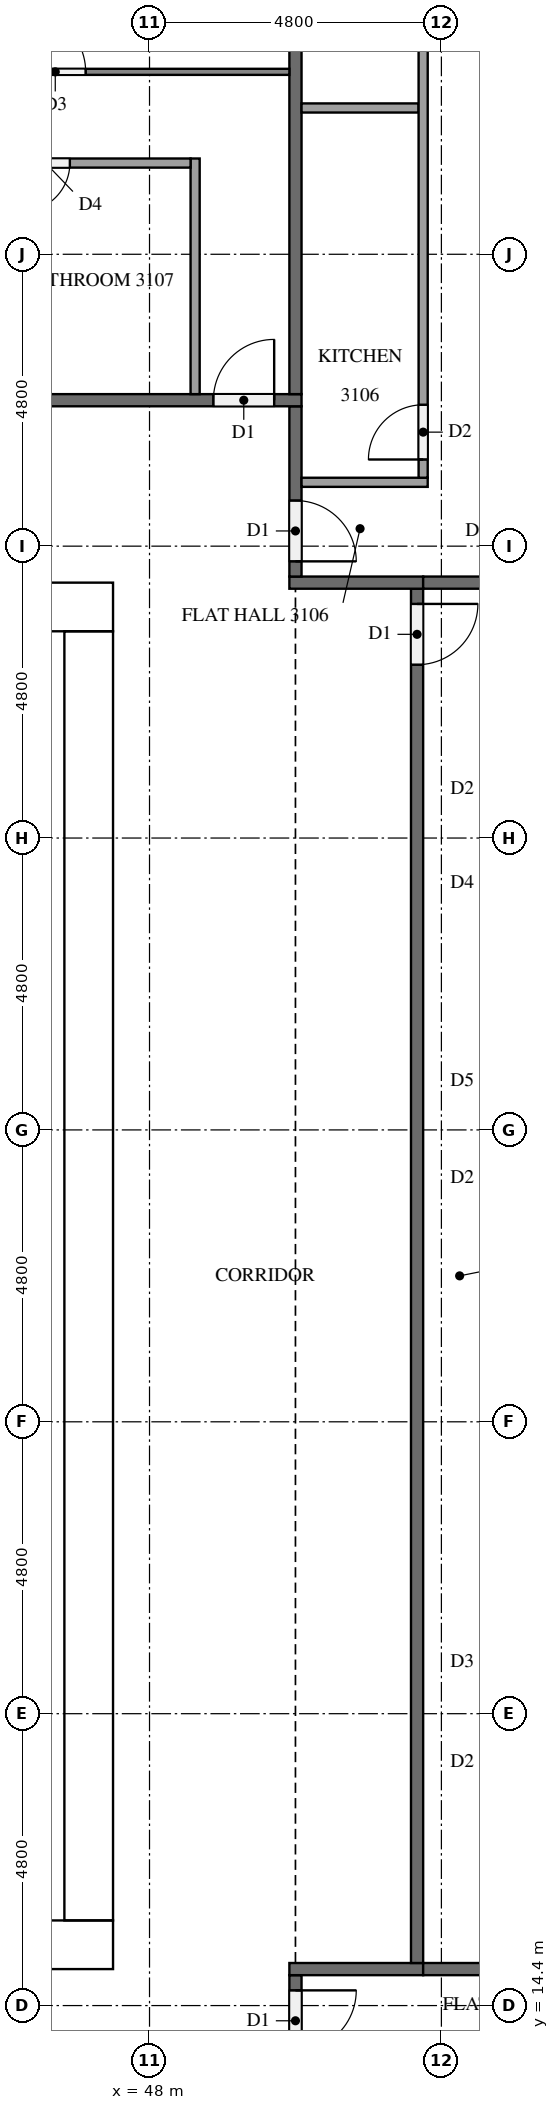
"""IFC4 building model, lengths in metres.
Left out: names, types, materials, properties, quantities, classifications, styles, units other than length and angle.
Written with IfcOpenShell. Run it as: python <this file> out.ifc"""

import sys

from ifc_helpers import new_model, si_unit, direction, frame, frame_2d, origin, place, context, subcontext, project, spatial, rectangle, extrude, element, fill, save


model = new_model("IFC4")
c1 = context("Model", 3, precision=1e-05, world=origin(), true_north=direction((0.0, 1.0)))
c2 = subcontext(c1, "Body", "Model", "MODEL_VIEW")
j1 = project(units=[si_unit("LENGTHUNIT", "METRE"), si_unit("PLANEANGLEUNIT", "RADIAN")], contexts=[c1])
p1 = place(None, origin())
s1 = spatial("IfcSite", under=j1, at=p1, CompositionType="ELEMENT")
p2 = place(p1, origin())
s2 = spatial("IfcBuilding", under=s1, at=p2, CompositionType="ELEMENT")
p3 = place(p2, frame((0.0, 0.0, 122.6)))
s3 = spatial("IfcBuildingStorey", under=s2, at=p3, CompositionType="ELEMENT", Elevation=122.6)
p4 = place(p3, frame((15.0, 15.4, 0.0), z_axis=(0.0, 0.0, 1.0), x_axis=(1.0, 0.0, 0.0)))
e1 = element("IfcWall", 1, at=p4, inside=s3, PredefinedType="SHEAR", context=c2, shape_type="SweptSolid", body=[
    extrude(rectangle(XDim=32.4, YDim=0.8, at=frame_2d((16.2, 0.0))), origin(), (0.0, 0.0, 1.0), 3.2),
])
p5 = place(p4, frame((15.3, 0.0, 0.0)))
e2 = element("IfcOpeningElement", 2, at=p5, cuts=e1, PredefinedType="OPENING", context=c2, shape_type="SweptSolid", body=[
    extrude(rectangle(XDim=1.8, YDim=2.1, at=frame_2d((0.9, 1.05))), frame((0.0, 0.41, 0.0), z_axis=(0.0, -1.0, 0.0), x_axis=(1.0, 0.0, 0.0)), (0.0, 0.0, 1.0), 0.82),
])
p6 = place(p3, frame((15.0, 37.4, 0.0), z_axis=(0.0, 0.0, 1.0), x_axis=(1.0, 0.0, 0.0)))
e3 = element("IfcWall", 3, at=p6, inside=s3, PredefinedType="SHEAR", context=c2, shape_type="SweptSolid", body=[
    extrude(rectangle(XDim=32.4, YDim=0.8, at=frame_2d((16.2, 0.0))), origin(), (0.0, 0.0, 1.0), 3.2),
])
p7 = place(p6, frame((15.3, 0.0, 0.0)))
e4 = element("IfcOpeningElement", 4, at=p7, cuts=e3, PredefinedType="OPENING", context=c2, shape_type="SweptSolid", body=[
    extrude(rectangle(XDim=1.8, YDim=2.1, at=frame_2d((0.9, 1.05))), frame((0.0, 0.41, 0.0), z_axis=(0.0, -1.0, 0.0), x_axis=(1.0, 0.0, 0.0)), (0.0, 0.0, 1.0), 0.82),
])
p8 = place(p6, frame((1.51, 0.0, 0.0)))
e5 = element("IfcOpeningElement", 5, at=p8, cuts=e3, PredefinedType="OPENING", context=c2, shape_type="SweptSolid", body=[
    extrude(rectangle(XDim=1.0, YDim=2.1, at=frame_2d((0.5, 1.05))), frame((0.0, 0.41, 0.0), z_axis=(0.0, -1.0, 0.0), x_axis=(1.0, 0.0, 0.0)), (0.0, 0.0, 1.0), 0.82),
])
p9 = place(p6, frame((5.11, 0.0, 0.0)))
e6 = element("IfcOpeningElement", 6, at=p9, cuts=e3, PredefinedType="OPENING", context=c2, shape_type="SweptSolid", body=[
    extrude(rectangle(XDim=1.0, YDim=2.1, at=frame_2d((0.5, 1.05))), frame((0.0, 0.41, 0.0), z_axis=(0.0, -1.0, 0.0), x_axis=(1.0, 0.0, 0.0)), (0.0, 0.0, 1.0), 0.82),
])
p10 = place(p3, frame((47.0, 15.8, 0.0), z_axis=(0.0, 0.0, 1.0), x_axis=(0.0, 1.0, 0.0)))
e7 = element("IfcWall", 7, at=p10, inside=s3, PredefinedType="SHEAR", context=c2, shape_type="SweptSolid", body=[
    extrude(rectangle(XDim=21.2, YDim=0.8, at=frame_2d((10.6, 0.0))), origin(), (0.0, 0.0, 1.0), 3.2),
])
p11 = place(p10, frame((10.3, 0.0, 0.0)))
e8 = element("IfcOpeningElement", 8, at=p11, cuts=e7, PredefinedType="OPENING", context=c2, shape_type="SweptSolid", body=[
    extrude(rectangle(XDim=1.2, YDim=2.1, at=frame_2d((0.6, 1.05))), frame((0.0, 0.41, 0.0), z_axis=(0.0, -1.0, 0.0), x_axis=(1.0, 0.0, 0.0)), (0.0, 0.0, 1.0), 0.82),
])
p12 = place(p3, frame((50.4, 14.9, 0.0), z_axis=(0.0, 0.0, 1.0), x_axis=(0.0, -1.0, 0.0)))
e9 = element("IfcWall", 9, at=p12, inside=s3, PredefinedType="PARTITIONING", context=c2, shape_type="SweptSolid", body=[
    extrude(rectangle(XDim=2.8, YDim=0.2, at=frame_2d((1.4, 0.0))), origin(), (0.0, 0.0, 1.0), 3.2),
])
p13 = place(p12, frame((0.25, 0.0, 0.0)))
e10 = element("IfcOpeningElement", 10, at=p13, cuts=e9, PredefinedType="OPENING", context=c2, shape_type="SweptSolid", body=[
    extrude(rectangle(XDim=1.0, YDim=2.1, at=frame_2d((0.5, 1.05))), frame((0.0, 0.11, 0.0), z_axis=(0.0, -1.0, 0.0), x_axis=(1.0, 0.0, 0.0)), (0.0, 0.0, 1.0), 0.22),
])
p14 = place(p3, frame((50.3, 15.0, 0.0), z_axis=(0.0, 0.0, 1.0), x_axis=(1.0, 0.0, 0.0)))
e11 = element("IfcWall", 11, at=p14, inside=s3, PredefinedType="PARTITIONING", context=c2, shape_type="SweptSolid", body=[
    extrude(rectangle(XDim=2.2, YDim=0.2, at=frame_2d((1.1, 0.0))), origin(), (0.0, 0.0, 1.0), 3.2),
])
p15 = place(p3, frame((52.4, 37.7, 0.0), z_axis=(0.0, 0.0, 1.0), x_axis=(0.0, -1.0, 0.0)))
e12 = element("IfcWall", 12, at=p15, inside=s3, PredefinedType="PARTITIONING", context=c2, shape_type="SweptSolid", body=[
    extrude(rectangle(XDim=22.6, YDim=0.2, at=frame_2d((11.3, 0.0))), origin(), (0.0, 0.0, 1.0), 3.2),
])
p16 = place(p15, frame((0.25, 0.0, 0.0)))
e13 = element("IfcOpeningElement", 13, at=p16, cuts=e12, PredefinedType="OPENING", context=c2, shape_type="SweptSolid", body=[
    extrude(rectangle(XDim=1.0, YDim=2.1, at=frame_2d((0.5, 1.05))), frame((0.0, 0.11, 0.0), z_axis=(0.0, -1.0, 0.0), x_axis=(1.0, 0.0, 0.0)), (0.0, 0.0, 1.0), 0.22),
])
p17 = place(p3, frame((52.5, 37.8, 0.0), z_axis=(0.0, 0.0, 1.0), x_axis=(-1.0, 0.0, 0.0)))
e14 = element("IfcWall", 14, at=p17, inside=s3, PredefinedType="PARTITIONING", context=c2, shape_type="SweptSolid", body=[
    extrude(rectangle(XDim=2.2, YDim=0.2, at=frame_2d((1.1, 0.0))), origin(), (0.0, 0.0, 1.0), 3.2),
])
p18 = place(p3, frame((50.4, 40.7, 0.0), z_axis=(0.0, 0.0, 1.0), x_axis=(0.0, -1.0, 0.0)))
e15 = element("IfcWall", 15, at=p18, inside=s3, PredefinedType="PARTITIONING", context=c2, shape_type="SweptSolid", body=[
    extrude(rectangle(XDim=2.8, YDim=0.2, at=frame_2d((1.4, 0.0))), origin(), (0.0, 0.0, 1.0), 3.2),
])
p19 = place(p18, frame((1.55, 0.0, 0.0)))
e16 = element("IfcOpeningElement", 16, at=p19, cuts=e15, PredefinedType="OPENING", context=c2, shape_type="SweptSolid", body=[
    extrude(rectangle(XDim=1.0, YDim=2.1, at=frame_2d((0.5, 1.05))), frame((0.0, 0.11, 0.0), z_axis=(0.0, -1.0, 0.0), x_axis=(1.0, 0.0, 0.0)), (0.0, 0.0, 1.0), 0.22),
])
p20 = place(p3, frame((11.9, 40.8, 0.0), z_axis=(0.0, 0.0, 1.0), x_axis=(1.0, 0.0, 0.0)))
e17 = element("IfcWall", 17, at=p20, inside=s3, PredefinedType="PARTITIONING", context=c2, shape_type="SweptSolid", body=[
    extrude(rectangle(XDim=38.6, YDim=0.2, at=frame_2d((19.3, 0.0))), origin(), (0.0, 0.0, 1.0), 3.2),
])
p21 = place(p20, frame((37.15, 0.0, 0.0)))
e18 = element("IfcOpeningElement", 18, at=p21, cuts=e17, PredefinedType="OPENING", context=c2, shape_type="SweptSolid", body=[
    extrude(rectangle(XDim=1.0, YDim=2.1, at=frame_2d((0.5, 1.05))), frame((0.0, 0.11, 0.0), z_axis=(0.0, -1.0, 0.0), x_axis=(1.0, 0.0, 0.0)), (0.0, 0.0, 1.0), 0.22),
])
p22 = place(p20, frame((27.55, 0.0, 0.0)))
e19 = element("IfcOpeningElement", 19, at=p22, cuts=e17, PredefinedType="OPENING", context=c2, shape_type="SweptSolid", body=[
    extrude(rectangle(XDim=1.0, YDim=2.1, at=frame_2d((0.5, 1.05))), frame((0.0, 0.11, 0.0), z_axis=(0.0, -1.0, 0.0), x_axis=(1.0, 0.0, 0.0)), (0.0, 0.0, 1.0), 0.22),
])
p23 = place(p20, frame((13.15, 0.0, 0.0)))
e20 = element("IfcOpeningElement", 20, at=p23, cuts=e17, PredefinedType="OPENING", context=c2, shape_type="SweptSolid", body=[
    extrude(rectangle(XDim=1.0, YDim=2.1, at=frame_2d((0.5, 1.05))), frame((0.0, 0.11, 0.0), z_axis=(0.0, -1.0, 0.0), x_axis=(1.0, 0.0, 0.0)), (0.0, 0.0, 1.0), 0.22),
])
p24 = place(p3, frame((52.5, 15.0, 0.0), z_axis=(0.0, 0.0, 1.0), x_axis=(1.0, 0.0, 0.0)))
e21 = element("IfcWall", 21, at=p24, inside=s3, PredefinedType="PARTITIONING", context=c2, shape_type="SweptSolid", body=[
    extrude(rectangle(XDim=5.0, YDim=0.2, at=frame_2d((2.5, 0.0))), origin(), (0.0, 0.0, 1.0), 3.2),
])
p25 = place(p3, frame((52.5, 37.8, 0.0), z_axis=(0.0, 0.0, 1.0), x_axis=(1.0, 0.0, 0.0)))
e22 = element("IfcWall", 22, at=p25, inside=s3, PredefinedType="PARTITIONING", context=c2, shape_type="SweptSolid", body=[
    extrude(rectangle(XDim=4.725, YDim=0.2, at=frame_2d((2.363, 0.0))), origin(), (0.0, 0.0, 1.0), 3.2),
])
p26 = place(p3, frame((50.4, 40.9, 0.0), z_axis=(0.0, 0.0, 1.0), x_axis=(0.0, 1.0, 0.0)))
e23 = element("IfcWall", 23, at=p26, inside=s3, PredefinedType="PARTITIONING", context=c2, shape_type="SweptSolid", body=[
    extrude(rectangle(XDim=11.8, YDim=0.2, at=frame_2d((5.9, 0.0))), origin(), (0.0, 0.0, 1.0), 3.2),
])
p27 = place(p3, frame((50.5, 45.606, 0.0), z_axis=(0.0, 0.0, 1.0), x_axis=(1.0, 0.0, 0.0)))
e24 = element("IfcWall", 24, at=p27, inside=s3, PredefinedType="PARTITIONING", context=c2, shape_type="SweptSolid", body=[
    extrude(rectangle(XDim=1.925, YDim=0.15, at=frame_2d((0.962, 0.0))), origin(), (0.0, 0.0, 1.0), 3.2),
])
p28 = place(p3, frame((50.5, 39.45, 0.0), z_axis=(0.0, 0.0, 1.0), x_axis=(1.0, 0.0, 0.0)))
e25 = element("IfcWall", 25, at=p28, inside=s3, PredefinedType="PARTITIONING", context=c2, shape_type="SweptSolid", body=[
    extrude(rectangle(XDim=2.075, YDim=0.15, at=frame_2d((1.038, 0.0))), origin(), (0.0, 0.0, 1.0), 3.2),
])
p29 = place(p3, frame((52.5, 39.525, 0.0), z_axis=(0.0, 0.0, 1.0), x_axis=(0.0, 1.0, 0.0)))
e26 = element("IfcWall", 26, at=p29, inside=s3, PredefinedType="PARTITIONING", context=c2, shape_type="SweptSolid", body=[
    extrude(rectangle(XDim=12.75, YDim=0.15, at=frame_2d((6.375, 0.0))), origin(), (0.0, 0.0, 1.0), 3.2),
])
p30 = place(p29, frame((0.3, 0.0, 0.0)))
e27 = element("IfcOpeningElement", 27, at=p30, cuts=e26, PredefinedType="OPENING", context=c2, shape_type="SweptSolid", body=[
    extrude(rectangle(XDim=0.9, YDim=2.1, at=frame_2d((0.45, 1.05))), frame((0.0, 0.085, 0.0), z_axis=(0.0, -1.0, 0.0), x_axis=(1.0, 0.0, 0.0)), (0.0, 0.0, 1.0), 0.17),
])
p31 = place(p29, frame((8.91, 0.0, 0.0)))
e28 = element("IfcOpeningElement", 28, at=p31, cuts=e26, PredefinedType="OPENING", context=c2, shape_type="SweptSolid", body=[
    extrude(rectangle(XDim=0.9, YDim=2.1, at=frame_2d((0.45, 1.05))), frame((0.0, 0.085, 0.0), z_axis=(0.0, -1.0, 0.0), x_axis=(1.0, 0.0, 0.0)), (0.0, 0.0, 1.0), 0.17),
])
p32 = place(p29, frame((10.46, 0.0, 0.0)))
e29 = element("IfcOpeningElement", 29, at=p32, cuts=e26, PredefinedType="OPENING", context=c2, shape_type="SweptSolid", body=[
    extrude(rectangle(XDim=0.8, YDim=2.1, at=frame_2d((0.4, 1.05))), frame((0.0, 0.085, 0.0), z_axis=(0.0, -1.0, 0.0), x_axis=(1.0, 0.0, 0.0)), (0.0, 0.0, 1.0), 0.17),
])
p33 = place(p3, frame((40.9, 46.2, 0.0), z_axis=(0.0, 0.0, 1.0), x_axis=(1.0, 0.0, 0.0)))
e30 = element("IfcWall", 30, at=p33, inside=s3, PredefinedType="PARTITIONING", context=c2, shape_type="SweptSolid", body=[
    extrude(rectangle(XDim=9.4, YDim=0.1, at=frame_2d((4.7, 0.0))), origin(), (0.0, 0.0, 1.0), 3.2),
])
p34 = place(p33, frame((5.05, 0.0, 0.0)))
e31 = element("IfcOpeningElement", 31, at=p34, cuts=e30, PredefinedType="OPENING", context=c2, shape_type="SweptSolid", body=[
    extrude(rectangle(XDim=1.0, YDim=2.1, at=frame_2d((0.5, 1.05))), frame((0.0, 0.06, 0.0), z_axis=(0.0, -1.0, 0.0), x_axis=(1.0, 0.0, 0.0)), (0.0, 0.0, 1.0), 0.12),
])
p35 = place(p33, frame((3.45, 0.0, 0.0)))
e32 = element("IfcOpeningElement", 32, at=p35, cuts=e30, PredefinedType="OPENING", context=c2, shape_type="SweptSolid", body=[
    extrude(rectangle(XDim=0.9, YDim=2.1, at=frame_2d((0.45, 1.05))), frame((0.0, 0.06, 0.0), z_axis=(0.0, -1.0, 0.0), x_axis=(1.0, 0.0, 0.0)), (0.0, 0.0, 1.0), 0.12),
])
p36 = place(p3, frame((48.75, 40.9, 0.0), z_axis=(0.0, 0.0, 1.0), x_axis=(0.0, 1.0, 0.0)))
e33 = element("IfcWall", 33, at=p36, inside=s3, PredefinedType="PARTITIONING", context=c2, shape_type="SweptSolid", body=[
    extrude(rectangle(XDim=3.875, YDim=0.15, at=frame_2d((1.938, 0.0))), origin(), (0.0, 0.0, 1.0), 3.2),
])
p37 = place(p3, frame((48.675, 44.7, 0.0), z_axis=(0.0, 0.0, 1.0), x_axis=(-1.0, 0.0, 0.0)))
e34 = element("IfcWall", 34, at=p37, inside=s3, PredefinedType="PARTITIONING", context=c2, shape_type="SweptSolid", body=[
    extrude(rectangle(XDim=7.775, YDim=0.15, at=frame_2d((3.888, 0.0))), origin(), (0.0, 0.0, 1.0), 3.2),
])
p38 = place(p37, frame((1.985, 0.0, 0.0)))
e35 = element("IfcOpeningElement", 35, at=p38, cuts=e34, PredefinedType="OPENING", context=c2, shape_type="SweptSolid", body=[
    extrude(rectangle(XDim=0.8, YDim=2.1, at=frame_2d((0.4, 1.05))), frame((0.0, 0.085, 0.0), z_axis=(0.0, -1.0, 0.0), x_axis=(1.0, 0.0, 0.0)), (0.0, 0.0, 1.0), 0.17),
])
p39 = place(p37, frame((3.435, 0.0, 0.0)))
e36 = element("IfcOpeningElement", 36, at=p39, cuts=e34, PredefinedType="OPENING", context=c2, shape_type="SweptSolid", body=[
    extrude(rectangle(XDim=0.9, YDim=2.1, at=frame_2d((0.45, 1.05))), frame((0.0, 0.085, 0.0), z_axis=(0.0, -1.0, 0.0), x_axis=(1.0, 0.0, 0.0)), (0.0, 0.0, 1.0), 0.17),
])
p40 = place(p11, origin())
e37 = element("IfcDoor", 37, at=p40, inside=s3, OperationType="SINGLE_SWING_LEFT", PredefinedType="DOOR", context=c2, shape_type="SweptSolid", body=[
    extrude(rectangle(XDim=1.2, YDim=2.1, at=frame_2d((0.6, 1.05))), frame((0.0, 0.025, 0.0), z_axis=(0.0, -1.0, 0.0), x_axis=(1.0, 0.0, 0.0)), (0.0, 0.0, 1.0), 0.05),
])
fill(e8, e37)
p41 = place(p13, origin())
e38 = element("IfcDoor", 38, at=p41, inside=s3, OperationType="SINGLE_SWING_LEFT", PredefinedType="DOOR", context=c2, shape_type="SweptSolid", body=[
    extrude(rectangle(XDim=1.0, YDim=2.1, at=frame_2d((0.5, 1.05))), frame((0.0, 0.025, 0.0), z_axis=(0.0, -1.0, 0.0), x_axis=(1.0, 0.0, 0.0)), (0.0, 0.0, 1.0), 0.05),
])
fill(e10, e38)
p42 = place(p16, origin())
e39 = element("IfcDoor", 39, at=p42, inside=s3, OperationType="SINGLE_SWING_LEFT", PredefinedType="DOOR", context=c2, shape_type="SweptSolid", body=[
    extrude(rectangle(XDim=1.0, YDim=2.1, at=frame_2d((0.5, 1.05))), frame((0.0, 0.025, 0.0), z_axis=(0.0, -1.0, 0.0), x_axis=(1.0, 0.0, 0.0)), (0.0, 0.0, 1.0), 0.05),
])
fill(e13, e39)
p43 = place(p19, origin())
e40 = element("IfcDoor", 40, at=p43, inside=s3, OperationType="SINGLE_SWING_RIGHT", PredefinedType="DOOR", context=c2, shape_type="SweptSolid", body=[
    extrude(rectangle(XDim=1.0, YDim=2.1, at=frame_2d((0.5, 1.05))), frame((0.0, 0.025, 0.0), z_axis=(0.0, -1.0, 0.0), x_axis=(1.0, 0.0, 0.0)), (0.0, 0.0, 1.0), 0.05),
])
fill(e16, e40)
p44 = place(p21, origin())
e41 = element("IfcDoor", 41, at=p44, inside=s3, OperationType="SINGLE_SWING_RIGHT", PredefinedType="DOOR", context=c2, shape_type="SweptSolid", body=[
    extrude(rectangle(XDim=1.0, YDim=2.1, at=frame_2d((0.5, 1.05))), frame((0.0, 0.025, 0.0), z_axis=(0.0, -1.0, 0.0), x_axis=(1.0, 0.0, 0.0)), (0.0, 0.0, 1.0), 0.05),
])
fill(e18, e41)
p45 = place(p30, origin())
e42 = element("IfcDoor", 42, at=p45, inside=s3, OperationType="SINGLE_SWING_LEFT", PredefinedType="DOOR", context=c2, shape_type="SweptSolid", body=[
    extrude(rectangle(XDim=0.9, YDim=2.1, at=frame_2d((0.45, 1.05))), frame((0.0, 0.025, 0.0), z_axis=(0.0, -1.0, 0.0), x_axis=(1.0, 0.0, 0.0)), (0.0, 0.0, 1.0), 0.05),
])
fill(e27, e42)
p46 = place(p34, origin())
e43 = element("IfcDoor", 43, at=p46, inside=s3, OperationType="SINGLE_SWING_LEFT", PredefinedType="DOOR", context=c2, shape_type="SweptSolid", body=[
    extrude(rectangle(XDim=1.0, YDim=2.1, at=frame_2d((0.5, 1.05))), frame((0.0, 0.025, 0.0), z_axis=(0.0, -1.0, 0.0), x_axis=(1.0, 0.0, 0.0)), (0.0, 0.0, 1.0), 0.05),
])
fill(e31, e43)
p47 = place(p38, origin())
e44 = element("IfcDoor", 44, at=p47, inside=s3, OperationType="SINGLE_SWING_RIGHT", PredefinedType="DOOR", context=c2, shape_type="SweptSolid", body=[
    extrude(rectangle(XDim=0.8, YDim=2.1, at=frame_2d((0.4, 1.05))), frame((0.0, 0.025, 0.0), z_axis=(0.0, -1.0, 0.0), x_axis=(1.0, 0.0, 0.0)), (0.0, 0.0, 1.0), 0.05),
])
fill(e35, e44)
save(model, sys.argv[1])
